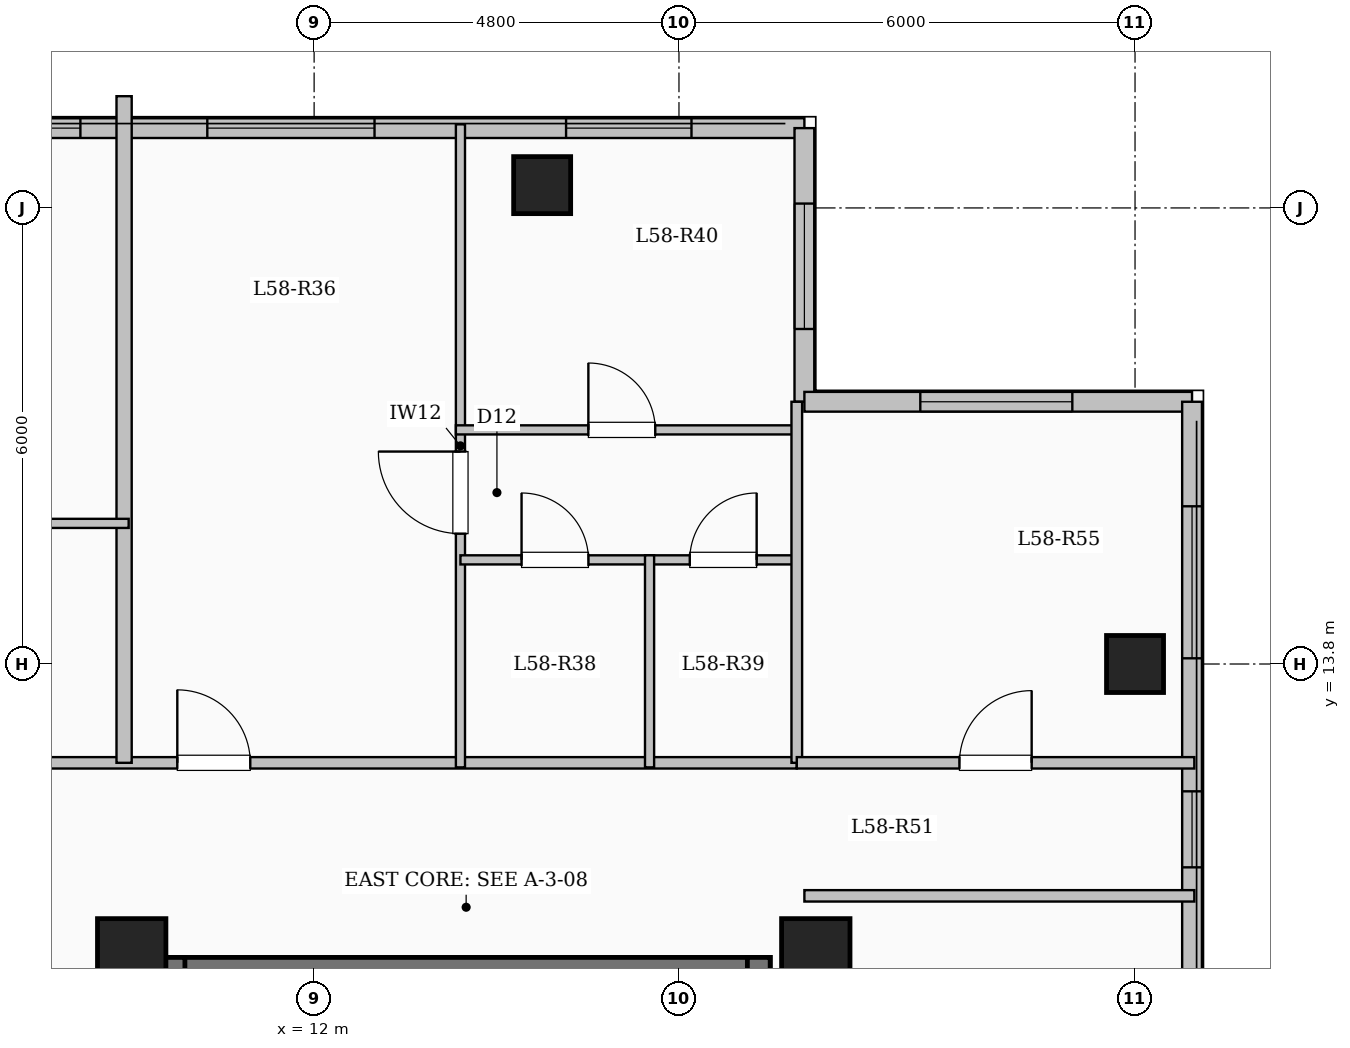
"""IFC4 building model, lengths in metres.
Left out: names, types, materials, properties, quantities, classifications, styles, units other than length and angle.
Written with IfcOpenShell. Run it as: python <this file> out.ifc"""

import sys

from ifc_helpers import new_model, si_unit, direction, frame, frame_2d, origin, origin_2d, place, context, subcontext, project, spatial, rectangle, extrude, element, fill, save


model = new_model("IFC4")
c1 = context("Model", 3, precision=1e-05, world=origin(), true_north=direction((0.0, 1.0)))
c2 = subcontext(c1, "Body", "Model", "MODEL_VIEW")
j1 = project(units=[si_unit("LENGTHUNIT", "METRE"), si_unit("PLANEANGLEUNIT", "RADIAN")], contexts=[c1])
p1 = place(None, origin())
s1 = spatial("IfcSite", under=j1, at=p1, CompositionType="ELEMENT")
p2 = place(p1, origin())
s2 = spatial("IfcBuilding", under=s1, at=p2, CompositionType="ELEMENT")
p3 = place(p2, frame((0.0, 0.0, 213.7)))
s3 = spatial("IfcBuildingStorey", under=s2, at=p3, CompositionType="ELEMENT", Elevation=213.7)
for number, where, z_axis, x_axis in (
    (1, (9.6, 10.0, 0.0), (0.0, 0.0, 1.0), (1.0, 0.0, 0.0)),
    (2, (18.6, 10.0, 0.0), (0.0, 0.0, 1.0), (1.0, 0.0, 0.0)),
):
    element("IfcColumn", number, at=place(p3, frame(where, z_axis=z_axis, x_axis=x_axis)), inside=s3, PredefinedType="COLUMN", context=c2, shape_type="SweptSolid", body=[
        extrude(rectangle(XDim=0.9, YDim=0.9, at=origin_2d()), origin(), (0.0, 0.0, 1.0), 3.35),
    ])
for number, where, z_axis, x_axis in (
    (3, (15.0, 20.1, 0.0), (0.0, 0.0, 1.0), (1.0, 0.0, 0.0)),
    (4, (22.8, 13.8, 0.0), (0.0, 0.0, 1.0), (1.0, 0.0, 0.0)),
):
    element("IfcColumn", number, at=place(p3, frame(where, z_axis=z_axis, x_axis=x_axis)), inside=s3, PredefinedType="COLUMN", context=c2, shape_type="SweptSolid", body=[
        extrude(rectangle(XDim=0.75, YDim=0.75, at=origin_2d()), origin(), (0.0, 0.0, 1.0), 3.35),
    ])
p4 = place(p3, frame((7.35, 20.85, 0.0), z_axis=(0.0, 0.0, 1.0), x_axis=(1.0, 0.0, 0.0)))
e5 = element("IfcWall", 5, at=p4, inside=s3, PredefinedType="SOLIDWALL", context=c2, shape_type="SweptSolid", body=[
    extrude(rectangle(XDim=11.1, YDim=0.26, at=frame_2d((5.55, 0.0))), origin(), (0.0, 0.0, 1.0), 3.1),
])
p5 = place(p4, frame((0.375, 0.0, 0.95)))
e6 = element("IfcOpeningElement", 6, at=p5, cuts=e5, PredefinedType="OPENING", context=c2, shape_type="SweptSolid", body=[
    extrude(rectangle(XDim=1.2, YDim=1.5, at=frame_2d((0.6, 0.75))), frame((0.0, 0.14, 0.0), z_axis=(0.0, -1.0, 0.0), x_axis=(1.0, 0.0, 0.0)), (0.0, 0.0, 1.0), 0.28),
])
p6 = place(p4, frame((3.245, 0.0, 0.9)))
e7 = element("IfcOpeningElement", 7, at=p6, cuts=e5, PredefinedType="OPENING", context=c2, shape_type="SweptSolid", body=[
    extrude(rectangle(XDim=2.2, YDim=1.75, at=frame_2d((1.1, 0.875))), frame((0.0, 0.14, 0.0), z_axis=(0.0, -1.0, 0.0), x_axis=(1.0, 0.0, 0.0)), (0.0, 0.0, 1.0), 0.28),
])
p7 = place(p4, frame((7.965, 0.0, 0.9)))
e8 = element("IfcOpeningElement", 8, at=p7, cuts=e5, PredefinedType="OPENING", context=c2, shape_type="SweptSolid", body=[
    extrude(rectangle(XDim=1.65, YDim=1.6, at=frame_2d((0.825, 0.8))), frame((0.0, 0.14, 0.0), z_axis=(0.0, -1.0, 0.0), x_axis=(1.0, 0.0, 0.0)), (0.0, 0.0, 1.0), 0.28),
])
p8 = place(p3, frame((18.45, 20.85, 0.0), z_axis=(0.0, 0.0, 1.0), x_axis=(0.0, -1.0, 0.0)))
e9 = element("IfcWall", 9, at=p8, inside=s3, PredefinedType="SOLIDWALL", context=c2, shape_type="SweptSolid", body=[
    extrude(rectangle(XDim=3.6, YDim=0.26, at=frame_2d((1.8, 0.0))), origin(), (0.0, 0.0, 1.0), 3.1),
])
p9 = place(p8, frame((0.992, 0.0, 0.9)))
e10 = element("IfcOpeningElement", 10, at=p9, cuts=e9, PredefinedType="OPENING", context=c2, shape_type="SweptSolid", body=[
    extrude(rectangle(XDim=1.65, YDim=1.6, at=frame_2d((0.825, 0.8))), frame((0.0, 0.14, 0.0), z_axis=(0.0, -1.0, 0.0), x_axis=(1.0, 0.0, 0.0)), (0.0, 0.0, 1.0), 0.28),
])
p10 = place(p3, frame((18.45, 17.25, 0.0), z_axis=(0.0, 0.0, 1.0), x_axis=(1.0, 0.0, 0.0)))
e11 = element("IfcWall", 11, at=p10, inside=s3, PredefinedType="SOLIDWALL", context=c2, shape_type="SweptSolid", body=[
    extrude(rectangle(XDim=5.1, YDim=0.26, at=frame_2d((2.55, 0.0))), origin(), (0.0, 0.0, 1.0), 3.1),
])
p11 = place(p10, frame((1.525, 0.0, 0.9)))
e12 = element("IfcOpeningElement", 12, at=p11, cuts=e11, PredefinedType="OPENING", context=c2, shape_type="SweptSolid", body=[
    extrude(rectangle(XDim=2.0, YDim=1.7, at=frame_2d((1.0, 0.85))), frame((0.0, 0.14, 0.0), z_axis=(0.0, -1.0, 0.0), x_axis=(1.0, 0.0, 0.0)), (0.0, 0.0, 1.0), 0.28),
])
p12 = place(p3, frame((23.55, 17.25, 0.0), z_axis=(0.0, 0.0, 1.0), x_axis=(0.0, -1.0, 0.0)))
e13 = element("IfcWall", 13, at=p12, inside=s3, PredefinedType="SOLIDWALL", context=c2, shape_type="SweptSolid", body=[
    extrude(rectangle(XDim=34.5, YDim=0.26, at=frame_2d((17.25, 0.0))), origin(), (0.0, 0.0, 1.0), 3.1),
])
p13 = place(p12, frame((1.375, 0.0, 0.9)))
e14 = element("IfcOpeningElement", 14, at=p13, cuts=e13, PredefinedType="OPENING", context=c2, shape_type="SweptSolid", body=[
    extrude(rectangle(XDim=2.0, YDim=1.7, at=frame_2d((1.0, 0.85))), frame((0.0, 0.14, 0.0), z_axis=(0.0, -1.0, 0.0), x_axis=(1.0, 0.0, 0.0)), (0.0, 0.0, 1.0), 0.28),
])
p14 = place(p12, frame((5.125, 0.0, 0.95)))
e15 = element("IfcOpeningElement", 15, at=p14, cuts=e13, PredefinedType="OPENING", context=c2, shape_type="SweptSolid", body=[
    extrude(rectangle(XDim=1.0, YDim=1.5, at=frame_2d((0.5, 0.75))), frame((0.0, 0.14, 0.0), z_axis=(0.0, -1.0, 0.0), x_axis=(1.0, 0.0, 0.0)), (0.0, 0.0, 1.0), 0.28),
])
p15 = place(p12, frame((14.5, 0.0, 0.9)))
e16 = element("IfcOpeningElement", 16, at=p15, cuts=e13, PredefinedType="OPENING", context=c2, shape_type="SweptSolid", body=[
    extrude(rectangle(XDim=2.0, YDim=1.7, at=frame_2d((1.0, 0.85))), frame((0.0, 0.14, 0.0), z_axis=(0.0, -1.0, 0.0), x_axis=(1.0, 0.0, 0.0)), (0.0, 0.0, 1.0), 0.28),
])
p16 = place(p12, frame((24.975, 0.0, 0.95)))
e17 = element("IfcOpeningElement", 17, at=p16, cuts=e13, PredefinedType="OPENING", context=c2, shape_type="SweptSolid", body=[
    extrude(rectangle(XDim=1.2, YDim=1.5, at=frame_2d((0.6, 0.75))), frame((0.0, 0.14, 0.0), z_axis=(0.0, -1.0, 0.0), x_axis=(1.0, 0.0, 0.0)), (0.0, 0.0, 1.0), 0.28),
])
p17 = place(p12, frame((29.475, 0.0, 0.9)))
e18 = element("IfcOpeningElement", 18, at=p17, cuts=e13, PredefinedType="OPENING", context=c2, shape_type="SweptSolid", body=[
    extrude(rectangle(XDim=2.2, YDim=1.75, at=frame_2d((1.1, 0.875))), frame((0.0, 0.14, 0.0), z_axis=(0.0, -1.0, 0.0), x_axis=(1.0, 0.0, 0.0)), (0.0, 0.0, 1.0), 0.28),
])
p18 = place(p3, frame((10.0, 9.79, 0.0), z_axis=(0.0, 0.0, 1.0), x_axis=(1.0, 0.0, 0.0)))
e19 = element("IfcWall", 19, at=p18, inside=s3, PredefinedType="SHEAR", context=c2, shape_type="SweptSolid", body=[
    extrude(rectangle(XDim=8.0, YDim=0.3, at=frame_2d((4.0, 0.0))), origin(), (0.0, 0.0, 1.0), 3.35),
])
for number, where, z_axis, x_axis in (
    (20, (10.15, 6.35, 0.0), (0.0, 0.0, 1.0), (0.0, 1.0, 0.0)),
    (21, (17.85, 6.35, 0.0), (0.0, 0.0, 1.0), (0.0, 1.0, 0.0)),
):
    element("IfcWall", number, at=place(p3, frame(where, z_axis=z_axis, x_axis=x_axis)), inside=s3, PredefinedType="SHEAR", context=c2, shape_type="SweptSolid", body=[
        extrude(rectangle(XDim=3.59, YDim=0.3, at=frame_2d((1.795, 0.0))), origin(), (0.0, 0.0, 1.0), 3.35),
    ])
p19 = place(p3, frame((3.85, 12.5, 0.0), z_axis=(0.0, 0.0, 1.0), x_axis=(1.0, 0.0, 0.0)))
e22 = element("IfcWall", 22, at=p19, inside=s3, PredefinedType="PARTITIONING", context=c2, shape_type="SweptSolid", body=[
    extrude(rectangle(XDim=14.5, YDim=0.15, at=frame_2d((7.25, 0.0))), origin(), (0.0, 0.0, 1.0), 3.1),
])
p20 = place(p19, frame((1.45, 0.0, 0.0)))
e23 = element("IfcOpeningElement", 23, at=p20, cuts=e22, PredefinedType="OPENING", context=c2, shape_type="SweptSolid", body=[
    extrude(rectangle(XDim=0.96, YDim=2.15, at=frame_2d((0.48, 1.075))), frame((0.0, 0.085, 0.0), z_axis=(0.0, -1.0, 0.0), x_axis=(1.0, 0.0, 0.0)), (0.0, 0.0, 1.0), 0.17),
])
p21 = place(p19, frame((6.35, 0.0, 0.0)))
e24 = element("IfcOpeningElement", 24, at=p21, cuts=e22, PredefinedType="OPENING", context=c2, shape_type="SweptSolid", body=[
    extrude(rectangle(XDim=0.96, YDim=2.15, at=frame_2d((0.48, 1.075))), frame((0.0, 0.085, 0.0), z_axis=(0.0, -1.0, 0.0), x_axis=(1.0, 0.0, 0.0)), (0.0, 0.0, 1.0), 0.17),
])
p22 = place(p3, frame((9.5, 12.5, 0.0), z_axis=(0.0, 0.0, 1.0), x_axis=(0.0, 1.0, 0.0)))
e25 = element("IfcWall", 25, at=p22, inside=s3, PredefinedType="SOLIDWALL", context=c2, shape_type="SweptSolid", body=[
    extrude(rectangle(XDim=8.77, YDim=0.2, at=frame_2d((4.385, 0.0))), origin(), (0.0, 0.0, 1.0), 3.1),
])
p23 = place(p3, frame((4.965, 15.65, 0.0), z_axis=(0.0, 0.0, 1.0), x_axis=(1.0, 0.0, 0.0)))
e26 = element("IfcWall", 26, at=p23, inside=s3, PredefinedType="PARTITIONING", context=c2, shape_type="SweptSolid", body=[
    extrude(rectangle(XDim=4.595, YDim=0.12, at=frame_2d((2.297, 0.0))), origin(), (0.0, 0.0, 1.0), 2.725),
])
p24 = place(p3, frame((13.925, 12.44, 0.0), z_axis=(0.0, 0.0, 1.0), x_axis=(0.0, 1.0, 0.0)))
e27 = element("IfcWall", 27, at=p24, inside=s3, PredefinedType="PARTITIONING", context=c2, shape_type="SweptSolid", body=[
    extrude(rectangle(XDim=8.46, YDim=0.12, at=frame_2d((4.23, 0.0))), origin(), (0.0, 0.0, 1.0), 3.1),
])
p25 = place(p24, frame((3.075, 0.0, 0.0)))
e28 = element("IfcOpeningElement", 28, at=p25, cuts=e27, PredefinedType="OPENING", context=c2, shape_type="SweptSolid", body=[
    extrude(rectangle(XDim=1.08, YDim=2.15, at=frame_2d((0.54, 1.075))), frame((0.0, 0.07, 0.0), z_axis=(0.0, -1.0, 0.0), x_axis=(1.0, 0.0, 0.0)), (0.0, 0.0, 1.0), 0.14),
])
p26 = place(p3, frame((13.925, 15.17, 0.0), z_axis=(0.0, 0.0, 1.0), x_axis=(1.0, 0.0, 0.0)))
e29 = element("IfcWall", 29, at=p26, inside=s3, PredefinedType="PARTITIONING", context=c2, shape_type="SweptSolid", body=[
    extrude(rectangle(XDim=2.488, YDim=0.12, at=frame_2d((1.244, 0.0))), origin(), (0.0, 0.0, 1.0), 3.1),
])
p27 = place(p26, frame((0.804, 0.0, 0.0)))
e30 = element("IfcOpeningElement", 30, at=p27, cuts=e29, PredefinedType="OPENING", context=c2, shape_type="SweptSolid", body=[
    extrude(rectangle(XDim=0.88, YDim=2.1, at=frame_2d((0.44, 1.05))), frame((0.0, 0.07, 0.0), z_axis=(0.0, -1.0, 0.0), x_axis=(1.0, 0.0, 0.0)), (0.0, 0.0, 1.0), 0.14),
])
p28 = place(p3, frame((16.413, 15.17, 0.0), z_axis=(0.0, 0.0, 1.0), x_axis=(1.0, 0.0, 0.0)))
e31 = element("IfcWall", 31, at=p28, inside=s3, PredefinedType="PARTITIONING", context=c2, shape_type="SweptSolid", body=[
    extrude(rectangle(XDim=1.937, YDim=0.12, at=frame_2d((0.969, 0.0))), origin(), (0.0, 0.0, 1.0), 3.1),
])
p29 = place(p28, frame((0.529, 0.0, 0.0)))
e32 = element("IfcOpeningElement", 32, at=p29, cuts=e31, PredefinedType="OPENING", context=c2, shape_type="SweptSolid", body=[
    extrude(rectangle(XDim=0.88, YDim=2.1, at=frame_2d((0.44, 1.05))), frame((0.0, 0.07, 0.0), z_axis=(0.0, -1.0, 0.0), x_axis=(1.0, 0.0, 0.0)), (0.0, 0.0, 1.0), 0.14),
])
p30 = place(p3, frame((13.865, 16.88, 0.0), z_axis=(0.0, 0.0, 1.0), x_axis=(1.0, 0.0, 0.0)))
e33 = element("IfcWall", 33, at=p30, inside=s3, PredefinedType="PARTITIONING", context=c2, shape_type="SweptSolid", body=[
    extrude(rectangle(XDim=4.545, YDim=0.12, at=frame_2d((2.272, 0.0))), origin(), (0.0, 0.0, 1.0), 2.725),
])
p31 = place(p30, frame((1.743, 0.0, 0.0)))
e34 = element("IfcOpeningElement", 34, at=p31, cuts=e33, PredefinedType="OPENING", context=c2, shape_type="SweptSolid", body=[
    extrude(rectangle(XDim=0.88, YDim=2.1, at=frame_2d((0.44, 1.05))), frame((0.0, 0.07, 0.0), z_axis=(0.0, -1.0, 0.0), x_axis=(1.0, 0.0, 0.0)), (0.0, 0.0, 1.0), 0.14),
])
p32 = place(p3, frame((16.413, 12.44, 0.0), z_axis=(0.0, 0.0, 1.0), x_axis=(0.0, 1.0, 0.0)))
e35 = element("IfcWall", 35, at=p32, inside=s3, PredefinedType="PARTITIONING", context=c2, shape_type="SweptSolid", body=[
    extrude(rectangle(XDim=2.79, YDim=0.12, at=frame_2d((1.395, 0.0))), origin(), (0.0, 0.0, 1.0), 3.1),
])
p33 = place(p3, frame((18.45, 10.75, 0.0), z_axis=(0.0, 0.0, 1.0), x_axis=(1.0, 0.0, 0.0)))
e36 = element("IfcWall", 36, at=p33, inside=s3, PredefinedType="PARTITIONING", context=c2, shape_type="SweptSolid", body=[
    extrude(rectangle(XDim=5.13, YDim=0.15, at=frame_2d((2.565, 0.0))), origin(), (0.0, 0.0, 1.0), 3.1),
])
p34 = place(p3, frame((18.35, 12.5, 0.0), z_axis=(0.0, 0.0, 1.0), x_axis=(0.0, 1.0, 0.0)))
e37 = element("IfcWall", 37, at=p34, inside=s3, PredefinedType="PARTITIONING", context=c2, shape_type="SweptSolid", body=[
    extrude(rectangle(XDim=4.75, YDim=0.14, at=frame_2d((2.375, 0.0))), origin(), (0.0, 0.0, 1.0), 3.1),
])
p35 = place(p3, frame((18.35, 12.5, 0.0), z_axis=(0.0, 0.0, 1.0), x_axis=(1.0, 0.0, 0.0)))
e38 = element("IfcWall", 38, at=p35, inside=s3, PredefinedType="PARTITIONING", context=c2, shape_type="SweptSolid", body=[
    extrude(rectangle(XDim=5.23, YDim=0.15, at=frame_2d((2.615, 0.0))), origin(), (0.0, 0.0, 1.0), 3.1),
])
p36 = place(p35, frame((2.14, 0.0, 0.0)))
e39 = element("IfcOpeningElement", 39, at=p36, cuts=e38, PredefinedType="OPENING", context=c2, shape_type="SweptSolid", body=[
    extrude(rectangle(XDim=0.95, YDim=2.15, at=frame_2d((0.475, 1.075))), frame((0.0, 0.085, 0.0), z_axis=(0.0, -1.0, 0.0), x_axis=(1.0, 0.0, 0.0)), (0.0, 0.0, 1.0), 0.17),
])
p37 = place(p5, origin())
e40 = element("IfcWindow", 40, at=p37, inside=s3, PartitioningType="SINGLE_PANEL", PredefinedType="WINDOW", context=c2, shape_type="SweptSolid", body=[
    extrude(rectangle(XDim=1.2, YDim=1.5, at=frame_2d((0.6, 0.75))), frame((0.0, 0.03, 0.0), z_axis=(0.0, -1.0, 0.0), x_axis=(1.0, 0.0, 0.0)), (0.0, 0.0, 1.0), 0.06),
])
fill(e6, e40)
p38 = place(p6, origin())
e41 = element("IfcWindow", 41, at=p38, inside=s3, PartitioningType="SINGLE_PANEL", PredefinedType="WINDOW", context=c2, shape_type="SweptSolid", body=[
    extrude(rectangle(XDim=2.2, YDim=1.75, at=frame_2d((1.1, 0.875))), frame((0.0, 0.03, 0.0), z_axis=(0.0, -1.0, 0.0), x_axis=(1.0, 0.0, 0.0)), (0.0, 0.0, 1.0), 0.06),
])
fill(e7, e41)
p39 = place(p7, origin())
e42 = element("IfcWindow", 42, at=p39, inside=s3, PartitioningType="SINGLE_PANEL", PredefinedType="WINDOW", context=c2, shape_type="SweptSolid", body=[
    extrude(rectangle(XDim=1.65, YDim=1.6, at=frame_2d((0.825, 0.8))), frame((0.0, 0.03, 0.0), z_axis=(0.0, -1.0, 0.0), x_axis=(1.0, 0.0, 0.0)), (0.0, 0.0, 1.0), 0.06),
])
fill(e8, e42)
p40 = place(p9, origin())
e43 = element("IfcWindow", 43, at=p40, inside=s3, PartitioningType="SINGLE_PANEL", PredefinedType="WINDOW", context=c2, shape_type="SweptSolid", body=[
    extrude(rectangle(XDim=1.65, YDim=1.6, at=frame_2d((0.825, 0.8))), frame((0.0, 0.03, 0.0), z_axis=(0.0, -1.0, 0.0), x_axis=(1.0, 0.0, 0.0)), (0.0, 0.0, 1.0), 0.06),
])
fill(e10, e43)
p41 = place(p11, origin())
e44 = element("IfcWindow", 44, at=p41, inside=s3, PartitioningType="SINGLE_PANEL", PredefinedType="WINDOW", context=c2, shape_type="SweptSolid", body=[
    extrude(rectangle(XDim=2.0, YDim=1.7, at=frame_2d((1.0, 0.85))), frame((0.0, 0.03, 0.0), z_axis=(0.0, -1.0, 0.0), x_axis=(1.0, 0.0, 0.0)), (0.0, 0.0, 1.0), 0.06),
])
fill(e12, e44)
p42 = place(p13, origin())
e45 = element("IfcWindow", 45, at=p42, inside=s3, PartitioningType="SINGLE_PANEL", PredefinedType="WINDOW", context=c2, shape_type="SweptSolid", body=[
    extrude(rectangle(XDim=2.0, YDim=1.7, at=frame_2d((1.0, 0.85))), frame((0.0, 0.03, 0.0), z_axis=(0.0, -1.0, 0.0), x_axis=(1.0, 0.0, 0.0)), (0.0, 0.0, 1.0), 0.06),
])
fill(e14, e45)
p43 = place(p14, origin())
e46 = element("IfcWindow", 46, at=p43, inside=s3, PartitioningType="SINGLE_PANEL", PredefinedType="WINDOW", context=c2, shape_type="SweptSolid", body=[
    extrude(rectangle(XDim=1.0, YDim=1.5, at=frame_2d((0.5, 0.75))), frame((0.0, 0.03, 0.0), z_axis=(0.0, -1.0, 0.0), x_axis=(1.0, 0.0, 0.0)), (0.0, 0.0, 1.0), 0.06),
])
fill(e15, e46)
p44 = place(p21, origin())
e47 = element("IfcDoor", 47, at=p44, inside=s3, OperationType="SINGLE_SWING_LEFT", PredefinedType="DOOR", context=c2, shape_type="SweptSolid", body=[
    extrude(rectangle(XDim=0.96, YDim=2.15, at=frame_2d((0.48, 1.075))), frame((0.0, 0.025, 0.0), z_axis=(0.0, -1.0, 0.0), x_axis=(1.0, 0.0, 0.0)), (0.0, 0.0, 1.0), 0.05),
])
fill(e24, e47)
p45 = place(p25, origin())
e48 = element("IfcDoor", 48, at=p45, inside=s3, OperationType="SINGLE_SWING_RIGHT", PredefinedType="DOOR", context=c2, shape_type="SweptSolid", body=[
    extrude(rectangle(XDim=1.08, YDim=2.15, at=frame_2d((0.54, 1.075))), frame((0.0, 0.025, 0.0), z_axis=(0.0, -1.0, 0.0), x_axis=(1.0, 0.0, 0.0)), (0.0, 0.0, 1.0), 0.05),
])
fill(e28, e48)
p46 = place(p27, origin())
e49 = element("IfcDoor", 49, at=p46, inside=s3, OperationType="SINGLE_SWING_LEFT", PredefinedType="DOOR", context=c2, shape_type="SweptSolid", body=[
    extrude(rectangle(XDim=0.88, YDim=2.1, at=frame_2d((0.44, 1.05))), frame((0.0, 0.025, 0.0), z_axis=(0.0, -1.0, 0.0), x_axis=(1.0, 0.0, 0.0)), (0.0, 0.0, 1.0), 0.05),
])
fill(e30, e49)
p47 = place(p29, origin())
e50 = element("IfcDoor", 50, at=p47, inside=s3, OperationType="SINGLE_SWING_RIGHT", PredefinedType="DOOR", context=c2, shape_type="SweptSolid", body=[
    extrude(rectangle(XDim=0.88, YDim=2.1, at=frame_2d((0.44, 1.05))), frame((0.0, 0.025, 0.0), z_axis=(0.0, -1.0, 0.0), x_axis=(1.0, 0.0, 0.0)), (0.0, 0.0, 1.0), 0.05),
])
fill(e32, e50)
p48 = place(p31, origin())
e51 = element("IfcDoor", 51, at=p48, inside=s3, OperationType="SINGLE_SWING_LEFT", PredefinedType="DOOR", context=c2, shape_type="SweptSolid", body=[
    extrude(rectangle(XDim=0.88, YDim=2.1, at=frame_2d((0.44, 1.05))), frame((0.0, 0.025, 0.0), z_axis=(0.0, -1.0, 0.0), x_axis=(1.0, 0.0, 0.0)), (0.0, 0.0, 1.0), 0.05),
])
fill(e34, e51)
p49 = place(p36, origin())
e52 = element("IfcDoor", 52, at=p49, inside=s3, OperationType="SINGLE_SWING_RIGHT", PredefinedType="DOOR", context=c2, shape_type="SweptSolid", body=[
    extrude(rectangle(XDim=0.95, YDim=2.15, at=frame_2d((0.475, 1.075))), frame((0.0, 0.025, 0.0), z_axis=(0.0, -1.0, 0.0), x_axis=(1.0, 0.0, 0.0)), (0.0, 0.0, 1.0), 0.05),
])
fill(e39, e52)
save(model, sys.argv[1])
